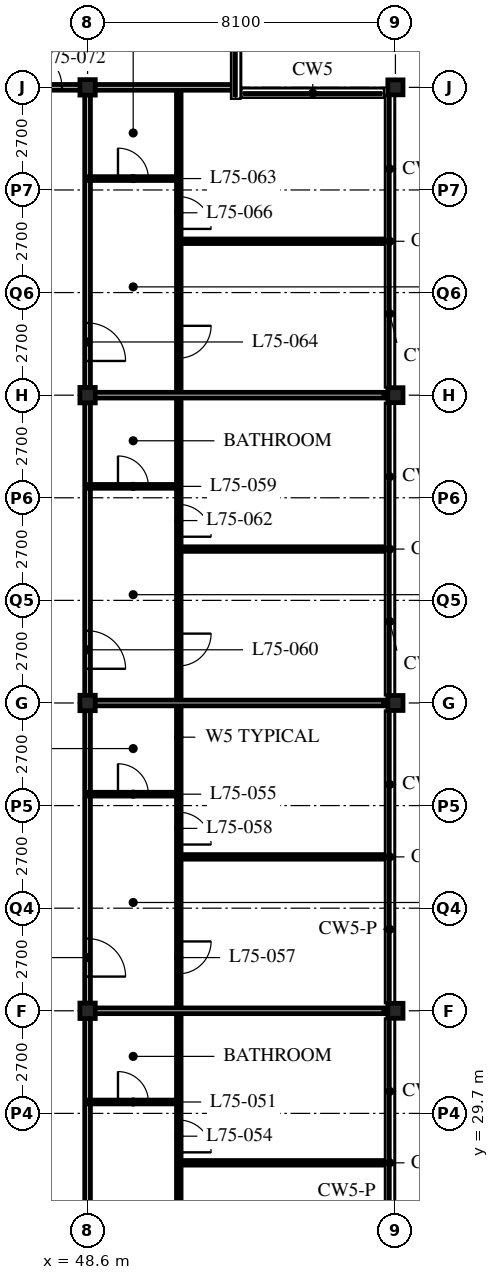
"""IFC4 building model, lengths in metres.
Left out: names, types, materials, properties, quantities, classifications, styles, units other than length and angle.
Written with IfcOpenShell. Run it as: python <this file> out.ifc"""

import sys

from ifc_helpers import new_model, si_unit, direction, frame, frame_2d, origin, origin_2d, place, context, subcontext, project, spatial, rectangle, i_section, extrude, element, fill, save


model = new_model("IFC4")
c1 = context("Model", 3, precision=1e-05, world=origin(), true_north=direction((0.0, 1.0)))
c2 = subcontext(c1, "Body", "Model", "MODEL_VIEW")
j1 = project(units=[si_unit("LENGTHUNIT", "METRE"), si_unit("PLANEANGLEUNIT", "RADIAN")], contexts=[c1])
p1 = place(None, origin())
s1 = spatial("IfcSite", under=j1, at=p1, CompositionType="ELEMENT")
p2 = place(p1, origin())
s2 = spatial("IfcBuilding", under=s1, at=p2, CompositionType="ELEMENT")
p3 = place(p2, frame((0.0, 0.0, 293.1)))
s3 = spatial("IfcBuildingStorey", under=s2, at=p3, CompositionType="ELEMENT", Elevation=293.1)
for number, where, z_axis, x_axis in (
    (1, (48.6, 32.4, 0.0), (0.0, 0.0, 1.0), (1.0, 0.0, 0.0)),
    (2, (48.6, 40.5, 0.0), (0.0, 0.0, 1.0), (1.0, 0.0, 0.0)),
    (3, (48.6, 48.6, 0.0), (0.0, 0.0, 1.0), (1.0, 0.0, 0.0)),
    (4, (48.6, 56.7, 0.0), (0.0, 0.0, 1.0), (1.0, 0.0, 0.0)),
):
    element("IfcColumn", number, at=place(p3, frame(where, z_axis=z_axis, x_axis=x_axis)), inside=s3, PredefinedType="COLUMN", context=c2, shape_type="SweptSolid", body=[
        extrude(i_section(OverallWidth=0.403, OverallDepth=0.406, WebThickness=0.027, FlangeThickness=0.043, FilletRadius=0.015, at=origin_2d()), origin(), (0.0, 0.0, 1.0), 5.4),
    ])
for number, where, z_axis, x_axis in (
    (5, (56.7, 32.4, 0.0), (0.0, 0.0, 1.0), (1.0, 0.0, 0.0)),
    (6, (56.7, 40.5, 0.0), (0.0, 0.0, 1.0), (1.0, 0.0, 0.0)),
    (7, (56.7, 48.6, 0.0), (0.0, 0.0, 1.0), (1.0, 0.0, 0.0)),
    (8, (56.7, 56.7, 0.0), (0.0, 0.0, 1.0), (1.0, 0.0, 0.0)),
):
    element("IfcColumn", number, at=place(p3, frame(where, z_axis=z_axis, x_axis=x_axis)), inside=s3, PredefinedType="COLUMN", context=c2, shape_type="SweptSolid", body=[
        extrude(i_section(OverallWidth=0.399, OverallDepth=0.394, WebThickness=0.023, FlangeThickness=0.037, FilletRadius=0.015, at=origin_2d()), origin(), (0.0, 0.0, 1.0), 5.4),
    ])
p4 = place(p3, frame((8.1, 56.738, 0.0), z_axis=(0.0, 0.0, 1.0), x_axis=(0.999999569095, -0.000928336791, 0.0)))
e9 = element("IfcWall", 9, at=p4, inside=s3, PredefinedType="PARTITIONING", context=c2, shape_type="SweptSolid", body=[
    extrude(rectangle(XDim=40.5, YDim=0.15, at=frame_2d((20.25, 0.0))), origin(), (0.0, 0.0, 1.0), 4.271),
])
p5 = place(p4, frame((4.45, 0.0, 0.0)))
e10 = element("IfcOpeningElement", 10, at=p5, cuts=e9, PredefinedType="OPENING", context=c2, shape_type="SweptSolid", body=[
    extrude(rectangle(XDim=1.0, YDim=2.1, at=frame_2d((0.5, 1.05))), frame((0.0, 0.085, 0.0), z_axis=(0.0, -1.0, 0.0), x_axis=(1.0, 0.0, 0.0)), (0.0, 0.0, 1.0), 0.17),
])
p6 = place(p4, frame((12.55, 0.0, 0.0)))
e11 = element("IfcOpeningElement", 11, at=p6, cuts=e9, PredefinedType="OPENING", context=c2, shape_type="SweptSolid", body=[
    extrude(rectangle(XDim=1.0, YDim=2.1, at=frame_2d((0.5, 1.05))), frame((0.0, 0.085, 0.0), z_axis=(0.0, -1.0, 0.0), x_axis=(1.0, 0.0, 0.0)), (0.0, 0.0, 1.0), 0.17),
])
p7 = place(p4, frame((20.65, 0.0, 0.0)))
e12 = element("IfcOpeningElement", 12, at=p7, cuts=e9, PredefinedType="OPENING", context=c2, shape_type="SweptSolid", body=[
    extrude(rectangle(XDim=1.0, YDim=2.1, at=frame_2d((0.5, 1.05))), frame((0.0, 0.085, 0.0), z_axis=(0.0, -1.0, 0.0), x_axis=(1.0, 0.0, 0.0)), (0.0, 0.0, 1.0), 0.17),
])
p8 = place(p4, frame((28.75, 0.0, 0.0)))
e13 = element("IfcOpeningElement", 13, at=p8, cuts=e9, PredefinedType="OPENING", context=c2, shape_type="SweptSolid", body=[
    extrude(rectangle(XDim=1.0, YDim=2.1, at=frame_2d((0.5, 1.05))), frame((0.0, 0.085, 0.0), z_axis=(0.0, -1.0, 0.0), x_axis=(1.0, 0.0, 0.0)), (0.0, 0.0, 1.0), 0.17),
])
p9 = place(p4, frame((38.825, 0.0, 0.0)))
e14 = element("IfcOpeningElement", 14, at=p9, cuts=e9, PredefinedType="OPENING", context=c2, shape_type="SweptSolid", body=[
    extrude(rectangle(XDim=1.0, YDim=2.1, at=frame_2d((0.5, 1.05))), frame((0.0, 0.085, 0.0), z_axis=(0.0, -1.0, 0.0), x_axis=(1.0, 0.0, 0.0)), (0.0, 0.0, 1.0), 0.17),
])
p10 = place(p4, frame((0.675, 0.0, 0.0)))
e15 = element("IfcOpeningElement", 15, at=p10, cuts=e9, PredefinedType="OPENING", context=c2, shape_type="SweptSolid", body=[
    extrude(rectangle(XDim=1.0, YDim=2.1, at=frame_2d((0.5, 1.05))), frame((0.0, 0.085, 0.0), z_axis=(0.0, -1.0, 0.0), x_axis=(1.0, 0.0, 0.0)), (0.0, 0.0, 1.0), 0.17),
])
p11 = place(p3, frame((48.6, 22.5, 0.0), z_axis=(0.0, 0.0, 1.0), x_axis=(0.0, 1.0, 0.0)))
e16 = element("IfcWall", 16, at=p11, inside=s3, PredefinedType="PARTITIONING", context=c2, shape_type="SweptSolid", body=[
    extrude(rectangle(XDim=34.2, YDim=0.15, at=frame_2d((17.1, 0.0))), origin(), (0.0, 0.0, 1.0), 4.271),
])
p12 = place(p11, frame((2.65, 0.0, 0.0)))
e17 = element("IfcOpeningElement", 17, at=p12, cuts=e16, PredefinedType="OPENING", context=c2, shape_type="SweptSolid", body=[
    extrude(rectangle(XDim=1.0, YDim=2.1, at=frame_2d((0.5, 1.05))), frame((0.0, 0.085, 0.0), z_axis=(0.0, -1.0, 0.0), x_axis=(1.0, 0.0, 0.0)), (0.0, 0.0, 1.0), 0.17),
])
p13 = place(p11, frame((10.8, 0.0, 0.0)))
e18 = element("IfcOpeningElement", 18, at=p13, cuts=e16, PredefinedType="OPENING", context=c2, shape_type="SweptSolid", body=[
    extrude(rectangle(XDim=1.0, YDim=2.1, at=frame_2d((0.5, 1.05))), frame((0.0, 0.085, 0.0), z_axis=(0.0, -1.0, 0.0), x_axis=(1.0, 0.0, 0.0)), (0.0, 0.0, 1.0), 0.17),
])
p14 = place(p11, frame((18.9, 0.0, 0.0)))
e19 = element("IfcOpeningElement", 19, at=p14, cuts=e16, PredefinedType="OPENING", context=c2, shape_type="SweptSolid", body=[
    extrude(rectangle(XDim=1.0, YDim=2.1, at=frame_2d((0.5, 1.05))), frame((0.0, 0.085, 0.0), z_axis=(0.0, -1.0, 0.0), x_axis=(1.0, 0.0, 0.0)), (0.0, 0.0, 1.0), 0.17),
])
p15 = place(p11, frame((27.0, 0.0, 0.0)))
e20 = element("IfcOpeningElement", 20, at=p15, cuts=e16, PredefinedType="OPENING", context=c2, shape_type="SweptSolid", body=[
    extrude(rectangle(XDim=1.0, YDim=2.1, at=frame_2d((0.5, 1.05))), frame((0.0, 0.085, 0.0), z_axis=(0.0, -1.0, 0.0), x_axis=(1.0, 0.0, 0.0)), (0.0, 0.0, 1.0), 0.17),
])
p16 = place(p3, frame((51.0, 22.5, 0.0), z_axis=(0.0, 0.0, 1.0), x_axis=(0.0, 1.0, 0.0)))
e21 = element("IfcWall", 21, at=p16, inside=s3, PredefinedType="PARTITIONING", context=c2, shape_type="SweptSolid", body=[
    extrude(rectangle(XDim=34.2, YDim=0.12, at=frame_2d((17.1, 0.0))), origin(), (0.0, 0.0, 1.0), 5.19),
])
p17 = place(p16, frame((0.975, 0.0, 0.0)))
e22 = element("IfcOpeningElement", 22, at=p17, cuts=e21, PredefinedType="OPENING", context=c2, shape_type="SweptSolid", body=[
    extrude(rectangle(XDim=0.85, YDim=2.1, at=frame_2d((0.425, 1.05))), frame((0.0, 0.07, 0.0), z_axis=(0.0, -1.0, 0.0), x_axis=(1.0, 0.0, 0.0)), (0.0, 0.0, 1.0), 0.14),
])
p18 = place(p16, frame((6.175, 0.0, 0.0)))
e23 = element("IfcOpeningElement", 23, at=p18, cuts=e21, PredefinedType="OPENING", context=c2, shape_type="SweptSolid", body=[
    extrude(rectangle(XDim=0.85, YDim=2.1, at=frame_2d((0.425, 1.05))), frame((0.0, 0.07, 0.0), z_axis=(0.0, -1.0, 0.0), x_axis=(1.0, 0.0, 0.0)), (0.0, 0.0, 1.0), 0.14),
])
p19 = place(p16, frame((10.875, 0.0, 0.0)))
e24 = element("IfcOpeningElement", 24, at=p19, cuts=e21, PredefinedType="OPENING", context=c2, shape_type="SweptSolid", body=[
    extrude(rectangle(XDim=0.85, YDim=2.1, at=frame_2d((0.425, 1.05))), frame((0.0, 0.07, 0.0), z_axis=(0.0, -1.0, 0.0), x_axis=(1.0, 0.0, 0.0)), (0.0, 0.0, 1.0), 0.14),
])
p20 = place(p16, frame((14.275, 0.0, 0.0)))
e25 = element("IfcOpeningElement", 25, at=p20, cuts=e21, PredefinedType="OPENING", context=c2, shape_type="SweptSolid", body=[
    extrude(rectangle(XDim=0.85, YDim=2.1, at=frame_2d((0.425, 1.05))), frame((0.0, 0.07, 0.0), z_axis=(0.0, -1.0, 0.0), x_axis=(1.0, 0.0, 0.0)), (0.0, 0.0, 1.0), 0.14),
])
p21 = place(p16, frame((18.975, 0.0, 0.0)))
e26 = element("IfcOpeningElement", 26, at=p21, cuts=e21, PredefinedType="OPENING", context=c2, shape_type="SweptSolid", body=[
    extrude(rectangle(XDim=0.85, YDim=2.1, at=frame_2d((0.425, 1.05))), frame((0.0, 0.07, 0.0), z_axis=(0.0, -1.0, 0.0), x_axis=(1.0, 0.0, 0.0)), (0.0, 0.0, 1.0), 0.14),
])
p22 = place(p16, frame((22.375, 0.0, 0.0)))
e27 = element("IfcOpeningElement", 27, at=p22, cuts=e21, PredefinedType="OPENING", context=c2, shape_type="SweptSolid", body=[
    extrude(rectangle(XDim=0.85, YDim=2.1, at=frame_2d((0.425, 1.05))), frame((0.0, 0.07, 0.0), z_axis=(0.0, -1.0, 0.0), x_axis=(1.0, 0.0, 0.0)), (0.0, 0.0, 1.0), 0.14),
])
p23 = place(p16, frame((27.075, 0.0, 0.0)))
e28 = element("IfcOpeningElement", 28, at=p23, cuts=e21, PredefinedType="OPENING", context=c2, shape_type="SweptSolid", body=[
    extrude(rectangle(XDim=0.85, YDim=2.1, at=frame_2d((0.425, 1.05))), frame((0.0, 0.07, 0.0), z_axis=(0.0, -1.0, 0.0), x_axis=(1.0, 0.0, 0.0)), (0.0, 0.0, 1.0), 0.14),
])
p24 = place(p16, frame((30.475, 0.0, 0.0)))
e29 = element("IfcOpeningElement", 29, at=p24, cuts=e21, PredefinedType="OPENING", context=c2, shape_type="SweptSolid", body=[
    extrude(rectangle(XDim=0.85, YDim=2.1, at=frame_2d((0.425, 1.05))), frame((0.0, 0.07, 0.0), z_axis=(0.0, -1.0, 0.0), x_axis=(1.0, 0.0, 0.0)), (0.0, 0.0, 1.0), 0.14),
])
p25 = place(p3, frame((48.6, 30.0, 0.0), z_axis=(0.0, 0.0, 1.0), x_axis=(1.0, 0.0, 0.0)))
e30 = element("IfcWall", 30, at=p25, inside=s3, PredefinedType="PARTITIONING", context=c2, shape_type="SweptSolid", body=[
    extrude(rectangle(XDim=2.4, YDim=0.1, at=frame_2d((1.2, 0.0))), origin(), (0.0, 0.0, 1.0), 5.19),
])
p26 = place(p25, frame((0.8, 0.0, 0.0)))
e31 = element("IfcOpeningElement", 31, at=p26, cuts=e30, PredefinedType="OPENING", context=c2, shape_type="SweptSolid", body=[
    extrude(rectangle(XDim=0.8, YDim=2.1, at=frame_2d((0.4, 1.05))), frame((0.0, 0.06, 0.0), z_axis=(0.0, -1.0, 0.0), x_axis=(1.0, 0.0, 0.0)), (0.0, 0.0, 1.0), 0.12),
])
p27 = place(p3, frame((51.0, 28.399, 0.0), z_axis=(0.0, 0.0, 1.0), x_axis=(1.0, 0.0, 0.0)))
e32 = element("IfcWall", 32, at=p27, inside=s3, PredefinedType="PARTITIONING", context=c2, shape_type="SweptSolid", body=[
    extrude(rectangle(XDim=5.422, YDim=0.12, at=frame_2d((2.711, 0.0))), origin(), (0.0, 0.0, 1.0), 5.19),
])
p28 = place(p3, frame((48.6, 32.4, 0.0), z_axis=(0.0, 0.0, 1.0), x_axis=(1.0, 0.0, 0.0)))
e33 = element("IfcWall", 33, at=p28, inside=s3, PredefinedType="PARTITIONING", context=c2, shape_type="SweptSolid", body=[
    extrude(rectangle(XDim=7.8, YDim=0.15, at=frame_2d((3.9, 0.0))), origin(), (0.0, 0.0, 1.0), 4.271),
])
p29 = place(p3, frame((48.6, 38.1, 0.0), z_axis=(0.0, 0.0, 1.0), x_axis=(1.0, 0.0, 0.0)))
e34 = element("IfcWall", 34, at=p29, inside=s3, PredefinedType="PARTITIONING", context=c2, shape_type="SweptSolid", body=[
    extrude(rectangle(XDim=2.4, YDim=0.1, at=frame_2d((1.2, 0.0))), origin(), (0.0, 0.0, 1.0), 5.19),
])
p30 = place(p29, frame((0.8, 0.0, 0.0)))
e35 = element("IfcOpeningElement", 35, at=p30, cuts=e34, PredefinedType="OPENING", context=c2, shape_type="SweptSolid", body=[
    extrude(rectangle(XDim=0.8, YDim=2.1, at=frame_2d((0.4, 1.05))), frame((0.0, 0.06, 0.0), z_axis=(0.0, -1.0, 0.0), x_axis=(1.0, 0.0, 0.0)), (0.0, 0.0, 1.0), 0.12),
])
p31 = place(p3, frame((51.0, 36.45, 0.0), z_axis=(0.0, 0.0, 1.0), x_axis=(1.0, 0.0, 0.0)))
e36 = element("IfcWall", 36, at=p31, inside=s3, PredefinedType="PARTITIONING", context=c2, shape_type="SweptSolid", body=[
    extrude(rectangle(XDim=5.422, YDim=0.12, at=frame_2d((2.711, 0.0))), origin(), (0.0, 0.0, 1.0), 5.19),
])
p32 = place(p3, frame((48.6, 40.5, 0.0), z_axis=(0.0, 0.0, 1.0), x_axis=(1.0, 0.0, 0.0)))
e37 = element("IfcWall", 37, at=p32, inside=s3, PredefinedType="PARTITIONING", context=c2, shape_type="SweptSolid", body=[
    extrude(rectangle(XDim=7.8, YDim=0.15, at=frame_2d((3.9, 0.0))), origin(), (0.0, 0.0, 1.0), 4.271),
])
p33 = place(p3, frame((48.6, 46.2, 0.0), z_axis=(0.0, 0.0, 1.0), x_axis=(1.0, 0.0, 0.0)))
e38 = element("IfcWall", 38, at=p33, inside=s3, PredefinedType="PARTITIONING", context=c2, shape_type="SweptSolid", body=[
    extrude(rectangle(XDim=2.4, YDim=0.1, at=frame_2d((1.2, 0.0))), origin(), (0.0, 0.0, 1.0), 5.19),
])
p34 = place(p33, frame((0.8, 0.0, 0.0)))
e39 = element("IfcOpeningElement", 39, at=p34, cuts=e38, PredefinedType="OPENING", context=c2, shape_type="SweptSolid", body=[
    extrude(rectangle(XDim=0.8, YDim=2.1, at=frame_2d((0.4, 1.05))), frame((0.0, 0.06, 0.0), z_axis=(0.0, -1.0, 0.0), x_axis=(1.0, 0.0, 0.0)), (0.0, 0.0, 1.0), 0.12),
])
p35 = place(p3, frame((51.0, 44.55, 0.0), z_axis=(0.0, 0.0, 1.0), x_axis=(1.0, 0.0, 0.0)))
e40 = element("IfcWall", 40, at=p35, inside=s3, PredefinedType="PARTITIONING", context=c2, shape_type="SweptSolid", body=[
    extrude(rectangle(XDim=5.422, YDim=0.12, at=frame_2d((2.711, 0.0))), origin(), (0.0, 0.0, 1.0), 5.19),
])
p36 = place(p3, frame((48.6, 48.6, 0.0), z_axis=(0.0, 0.0, 1.0), x_axis=(1.0, 0.0, 0.0)))
e41 = element("IfcWall", 41, at=p36, inside=s3, PredefinedType="PARTITIONING", context=c2, shape_type="SweptSolid", body=[
    extrude(rectangle(XDim=7.8, YDim=0.15, at=frame_2d((3.9, 0.0))), origin(), (0.0, 0.0, 1.0), 4.271),
])
p37 = place(p3, frame((48.6, 54.3, 0.0), z_axis=(0.0, 0.0, 1.0), x_axis=(1.0, 0.0, 0.0)))
e42 = element("IfcWall", 42, at=p37, inside=s3, PredefinedType="PARTITIONING", context=c2, shape_type="SweptSolid", body=[
    extrude(rectangle(XDim=2.4, YDim=0.1, at=frame_2d((1.2, 0.0))), origin(), (0.0, 0.0, 1.0), 5.19),
])
p38 = place(p37, frame((0.8, 0.0, 0.0)))
e43 = element("IfcOpeningElement", 43, at=p38, cuts=e42, PredefinedType="OPENING", context=c2, shape_type="SweptSolid", body=[
    extrude(rectangle(XDim=0.8, YDim=2.1, at=frame_2d((0.4, 1.05))), frame((0.0, 0.06, 0.0), z_axis=(0.0, -1.0, 0.0), x_axis=(1.0, 0.0, 0.0)), (0.0, 0.0, 1.0), 0.12),
])
p39 = place(p3, frame((51.0, 52.65, 0.0), z_axis=(0.0, 0.0, 1.0), x_axis=(1.0, 0.0, 0.0)))
e44 = element("IfcWall", 44, at=p39, inside=s3, PredefinedType="PARTITIONING", context=c2, shape_type="SweptSolid", body=[
    extrude(rectangle(XDim=5.422, YDim=0.12, at=frame_2d((2.711, 0.0))), origin(), (0.0, 0.0, 1.0), 5.19),
])
p40 = place(p3, frame((48.6, 56.7, 0.0), z_axis=(0.0, 0.0, 1.0), x_axis=(1.0, 0.0, 0.0)))
e45 = element("IfcWall", 45, at=p40, inside=s3, PredefinedType="PARTITIONING", context=c2, shape_type="SweptSolid", body=[
    extrude(rectangle(XDim=3.879, YDim=0.15, at=frame_2d((1.939, 0.0))), origin(), (0.0, 0.0, 1.0), 4.271),
])
p41 = place(p26, origin())
e46 = element("IfcDoor", 46, at=p41, inside=s3, OperationType="SINGLE_SWING_LEFT", PredefinedType="DOOR", context=c2, shape_type="SweptSolid", body=[
    extrude(rectangle(XDim=0.8, YDim=2.1, at=frame_2d((0.4, 1.05))), frame((0.0, 0.025, 0.0), z_axis=(0.0, -1.0, 0.0), x_axis=(1.0, 0.0, 0.0)), (0.0, 0.0, 1.0), 0.05),
])
fill(e31, e46)
p42 = place(p18, origin())
e47 = element("IfcDoor", 47, at=p42, inside=s3, OperationType="SINGLE_SWING_RIGHT", PredefinedType="DOOR", context=c2, shape_type="SweptSolid", body=[
    extrude(rectangle(XDim=0.85, YDim=2.1, at=frame_2d((0.425, 1.05))), frame((0.0, 0.025, 0.0), z_axis=(0.0, -1.0, 0.0), x_axis=(1.0, 0.0, 0.0)), (0.0, 0.0, 1.0), 0.05),
])
fill(e23, e47)
p43 = place(p30, origin())
e48 = element("IfcDoor", 48, at=p43, inside=s3, OperationType="SINGLE_SWING_LEFT", PredefinedType="DOOR", context=c2, shape_type="SweptSolid", body=[
    extrude(rectangle(XDim=0.8, YDim=2.1, at=frame_2d((0.4, 1.05))), frame((0.0, 0.025, 0.0), z_axis=(0.0, -1.0, 0.0), x_axis=(1.0, 0.0, 0.0)), (0.0, 0.0, 1.0), 0.05),
])
fill(e35, e48)
p44 = place(p13, origin())
e49 = element("IfcDoor", 49, at=p44, inside=s3, OperationType="SINGLE_SWING_RIGHT", PredefinedType="DOOR", context=c2, shape_type="SweptSolid", body=[
    extrude(rectangle(XDim=1.0, YDim=2.1, at=frame_2d((0.5, 1.05))), frame((0.0, 0.025, 0.0), z_axis=(0.0, -1.0, 0.0), x_axis=(1.0, 0.0, 0.0)), (0.0, 0.0, 1.0), 0.05),
])
fill(e18, e49)
p45 = place(p19, origin())
e50 = element("IfcDoor", 50, at=p45, inside=s3, OperationType="SINGLE_SWING_LEFT", PredefinedType="DOOR", context=c2, shape_type="SweptSolid", body=[
    extrude(rectangle(XDim=0.85, YDim=2.1, at=frame_2d((0.425, 1.05))), frame((0.0, 0.025, 0.0), z_axis=(0.0, -1.0, 0.0), x_axis=(1.0, 0.0, 0.0)), (0.0, 0.0, 1.0), 0.05),
])
fill(e24, e50)
p46 = place(p20, origin())
e51 = element("IfcDoor", 51, at=p46, inside=s3, OperationType="SINGLE_SWING_RIGHT", PredefinedType="DOOR", context=c2, shape_type="SweptSolid", body=[
    extrude(rectangle(XDim=0.85, YDim=2.1, at=frame_2d((0.425, 1.05))), frame((0.0, 0.025, 0.0), z_axis=(0.0, -1.0, 0.0), x_axis=(1.0, 0.0, 0.0)), (0.0, 0.0, 1.0), 0.05),
])
fill(e25, e51)
p47 = place(p34, origin())
e52 = element("IfcDoor", 52, at=p47, inside=s3, OperationType="SINGLE_SWING_LEFT", PredefinedType="DOOR", context=c2, shape_type="SweptSolid", body=[
    extrude(rectangle(XDim=0.8, YDim=2.1, at=frame_2d((0.4, 1.05))), frame((0.0, 0.025, 0.0), z_axis=(0.0, -1.0, 0.0), x_axis=(1.0, 0.0, 0.0)), (0.0, 0.0, 1.0), 0.05),
])
fill(e39, e52)
p48 = place(p14, origin())
e53 = element("IfcDoor", 53, at=p48, inside=s3, OperationType="SINGLE_SWING_RIGHT", PredefinedType="DOOR", context=c2, shape_type="SweptSolid", body=[
    extrude(rectangle(XDim=1.0, YDim=2.1, at=frame_2d((0.5, 1.05))), frame((0.0, 0.025, 0.0), z_axis=(0.0, -1.0, 0.0), x_axis=(1.0, 0.0, 0.0)), (0.0, 0.0, 1.0), 0.05),
])
fill(e19, e53)
p49 = place(p21, origin())
e54 = element("IfcDoor", 54, at=p49, inside=s3, OperationType="SINGLE_SWING_LEFT", PredefinedType="DOOR", context=c2, shape_type="SweptSolid", body=[
    extrude(rectangle(XDim=0.85, YDim=2.1, at=frame_2d((0.425, 1.05))), frame((0.0, 0.025, 0.0), z_axis=(0.0, -1.0, 0.0), x_axis=(1.0, 0.0, 0.0)), (0.0, 0.0, 1.0), 0.05),
])
fill(e26, e54)
p50 = place(p22, origin())
e55 = element("IfcDoor", 55, at=p50, inside=s3, OperationType="SINGLE_SWING_RIGHT", PredefinedType="DOOR", context=c2, shape_type="SweptSolid", body=[
    extrude(rectangle(XDim=0.85, YDim=2.1, at=frame_2d((0.425, 1.05))), frame((0.0, 0.025, 0.0), z_axis=(0.0, -1.0, 0.0), x_axis=(1.0, 0.0, 0.0)), (0.0, 0.0, 1.0), 0.05),
])
fill(e27, e55)
p51 = place(p38, origin())
e56 = element("IfcDoor", 56, at=p51, inside=s3, OperationType="SINGLE_SWING_LEFT", PredefinedType="DOOR", context=c2, shape_type="SweptSolid", body=[
    extrude(rectangle(XDim=0.8, YDim=2.1, at=frame_2d((0.4, 1.05))), frame((0.0, 0.025, 0.0), z_axis=(0.0, -1.0, 0.0), x_axis=(1.0, 0.0, 0.0)), (0.0, 0.0, 1.0), 0.05),
])
fill(e43, e56)
p52 = place(p15, origin())
e57 = element("IfcDoor", 57, at=p52, inside=s3, OperationType="SINGLE_SWING_RIGHT", PredefinedType="DOOR", context=c2, shape_type="SweptSolid", body=[
    extrude(rectangle(XDim=1.0, YDim=2.1, at=frame_2d((0.5, 1.05))), frame((0.0, 0.025, 0.0), z_axis=(0.0, -1.0, 0.0), x_axis=(1.0, 0.0, 0.0)), (0.0, 0.0, 1.0), 0.05),
])
fill(e20, e57)
p53 = place(p23, origin())
e58 = element("IfcDoor", 58, at=p53, inside=s3, OperationType="SINGLE_SWING_LEFT", PredefinedType="DOOR", context=c2, shape_type="SweptSolid", body=[
    extrude(rectangle(XDim=0.85, YDim=2.1, at=frame_2d((0.425, 1.05))), frame((0.0, 0.025, 0.0), z_axis=(0.0, -1.0, 0.0), x_axis=(1.0, 0.0, 0.0)), (0.0, 0.0, 1.0), 0.05),
])
fill(e28, e58)
p54 = place(p24, origin())
e59 = element("IfcDoor", 59, at=p54, inside=s3, OperationType="SINGLE_SWING_RIGHT", PredefinedType="DOOR", context=c2, shape_type="SweptSolid", body=[
    extrude(rectangle(XDim=0.85, YDim=2.1, at=frame_2d((0.425, 1.05))), frame((0.0, 0.025, 0.0), z_axis=(0.0, -1.0, 0.0), x_axis=(1.0, 0.0, 0.0)), (0.0, 0.0, 1.0), 0.05),
])
fill(e29, e59)
p55 = place(p9, origin())
e60 = element("IfcDoor", 60, at=p55, inside=s3, OperationType="SINGLE_SWING_LEFT", PredefinedType="DOOR", context=c2, shape_type="SweptSolid", body=[
    extrude(rectangle(XDim=1.0, YDim=2.1, at=frame_2d((0.5, 1.05))), frame((0.0, 0.025, 0.0), z_axis=(0.0, -1.0, 0.0), x_axis=(1.0, 0.0, 0.0)), (0.0, 0.0, 1.0), 0.05),
])
fill(e14, e60)
save(model, sys.argv[1])
